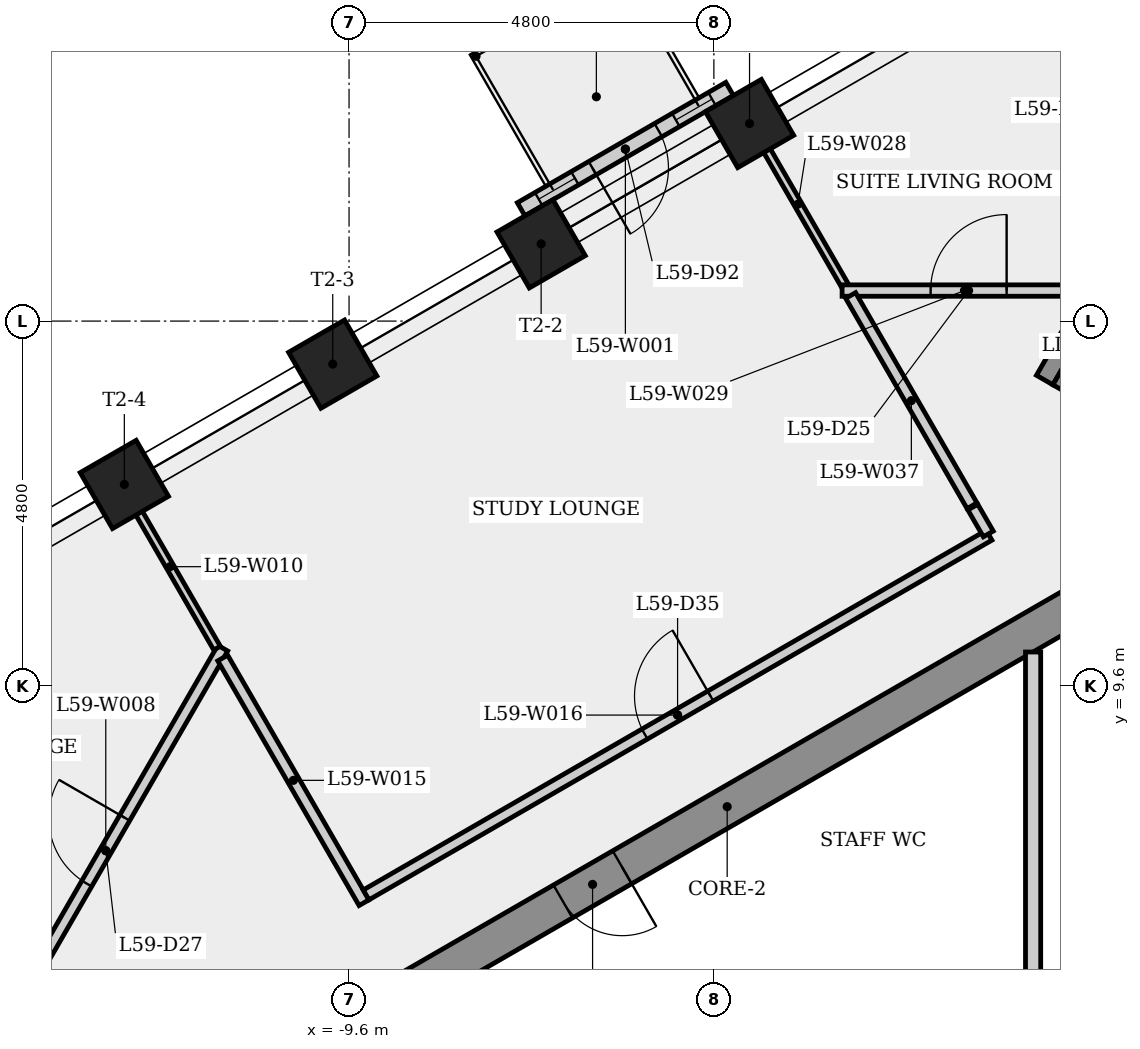
"""IFC4 building model, lengths in metres.
Left out: names, types, materials, properties, quantities, classifications, styles, units other than length and angle.
Written with IfcOpenShell. Run it as: python <this file> out.ifc"""

import sys

from ifc_helpers import new_model, si_unit, direction, frame, frame_2d, origin, origin_2d, place, context, subcontext, project, spatial, rectangle, extrude, element, fill, save


model = new_model("IFC4")
c1 = context("Model", 3, precision=1e-05, world=origin(), true_north=direction((0.0, 1.0)))
c2 = subcontext(c1, "Body", "Model", "MODEL_VIEW")
j1 = project(units=[si_unit("LENGTHUNIT", "METRE"), si_unit("PLANEANGLEUNIT", "RADIAN")], contexts=[c1])
p1 = place(None, origin())
s1 = spatial("IfcSite", under=j1, at=p1, CompositionType="ELEMENT")
p2 = place(p1, origin())
s2 = spatial("IfcBuilding", under=s1, at=p2, CompositionType="ELEMENT")
p3 = place(p2, frame((0.0, 0.0, 222.3)))
s3 = spatial("IfcBuildingStorey", under=s2, at=p3, CompositionType="ELEMENT", Elevation=222.3)
p4 = place(p3, frame((9.375, 5.268, 0.0), z_axis=(0.0, 0.0, 1.0), x_axis=(-0.866023993627, 0.500002442456, 0.0)))
e1 = element("IfcWall", 1, at=p4, inside=s3, PredefinedType="SHEAR", context=c2, shape_type="SweptSolid", body=[
    extrude(rectangle(XDim=10.97, YDim=0.5, at=frame_2d((5.485, 0.0))), origin(), (0.0, 0.0, 1.0), 3.4),
])
p5 = place(p4, frame((5.382, 0.0, 0.0)))
e2 = element("IfcOpeningElement", 2, at=p5, cuts=e1, PredefinedType="OPENING", context=c2, shape_type="SweptSolid", body=[
    extrude(rectangle(XDim=0.9, YDim=2.1, at=frame_2d((0.45, 1.05))), frame((0.0, 0.26, 0.0), z_axis=(0.0, -1.0, 0.0), x_axis=(1.0, 0.0, 0.0)), (0.0, 0.0, 1.0), 0.52),
])
p6 = place(p3, frame((0.125, 10.753, 0.0), z_axis=(0.0, 0.0, 1.0), x_axis=(-0.866023993627, -0.500002442456, 0.0)))
e3 = element("IfcWall", 3, at=p6, inside=s3, PredefinedType="SHEAR", context=c2, shape_type="SweptSolid", body=[
    extrude(rectangle(XDim=10.97, YDim=0.5, at=frame_2d((5.485, 0.0))), origin(), (0.0, 0.0, 1.0), 3.4),
])
p7 = place(p6, frame((7.08, 0.0, 0.0)))
e4 = element("IfcOpeningElement", 4, at=p7, cuts=e3, PredefinedType="OPENING", context=c2, shape_type="SweptSolid", body=[
    extrude(rectangle(XDim=0.9, YDim=2.1, at=frame_2d((0.45, 1.05))), frame((0.0, 0.26, 0.0), z_axis=(0.0, -1.0, 0.0), x_axis=(1.0, 0.0, 0.0)), (0.0, 0.0, 1.0), 0.52),
])
for number, where, z_axis, x_axis in (
    (5, (-4.331, 17.0, 0.0), (0.0, 0.0, 1.0), (-0.5, 0.866, 0.0)),
    (6, (-7.073, 15.417, 0.0), (0.0, 0.0, 1.0), (-0.5, 0.866, 0.0)),
    (7, (-9.815, 13.833, 0.0), (0.0, 0.0, 1.0), (-0.5, 0.866, 0.0)),
    (8, (-12.557, 12.25, 0.0), (0.0, 0.0, 1.0), (-0.5, 0.866, 0.0)),
):
    element("IfcColumn", number, at=place(p3, frame(where, z_axis=z_axis, x_axis=x_axis)), inside=s3, PredefinedType="COLUMN", context=c2, shape_type="SweptSolid", body=[
        extrude(rectangle(XDim=0.85, YDim=0.85, at=origin_2d()), origin(), (0.0, 0.0, 1.0), 3.4),
    ])
p8 = place(p3, frame((-4.593, 17.454, 0.0), z_axis=(0.0, 0.0, 1.0), x_axis=(-0.866023832351, -0.500002721793, 0.0)))
e9 = element("IfcWall", 9, at=p8, inside=s3, PredefinedType="SOLIDWALL", context=c2, shape_type="SweptSolid", body=[
    extrude(rectangle(XDim=3.167, YDim=0.2, at=frame_2d((1.583, 0.0))), origin(), (0.0, 0.0, 1.0), 3.4),
])
p9 = place(p8, frame((1.083, 0.0, 0.0)))
e10 = element("IfcOpeningElement", 10, at=p9, cuts=e9, PredefinedType="OPENING", context=c2, shape_type="SweptSolid", body=[
    extrude(rectangle(XDim=1.0, YDim=2.4, at=frame_2d((0.5, 1.2))), frame((0.0, 0.11, 0.0), z_axis=(0.0, -1.0, 0.0), x_axis=(1.0, 0.0, 0.0)), (0.0, 0.0, 1.0), 0.22),
])
p10 = place(p8, frame((0.267, 0.0, 0.9)))
e11 = element("IfcOpeningElement", 11, at=p10, cuts=e9, PredefinedType="OPENING", context=c2, shape_type="SweptSolid", body=[
    extrude(rectangle(XDim=0.55, YDim=1.5, at=frame_2d((0.275, 0.75))), frame((0.0, 0.11, 0.0), z_axis=(0.0, -1.0, 0.0), x_axis=(1.0, 0.0, 0.0)), (0.0, 0.0, 1.0), 0.22),
])
p11 = place(p8, frame((2.35, 0.0, 0.9)))
e12 = element("IfcOpeningElement", 12, at=p11, cuts=e9, PredefinedType="OPENING", context=c2, shape_type="SweptSolid", body=[
    extrude(rectangle(XDim=0.55, YDim=1.5, at=frame_2d((0.275, 0.75))), frame((0.0, 0.11, 0.0), z_axis=(0.0, -1.0, 0.0), x_axis=(1.0, 0.0, 0.0)), (0.0, 0.0, 1.0), 0.22),
])
p12 = place(p3, frame((-14.34, 4.766, 0.0), z_axis=(0.0, 0.0, 1.0), x_axis=(0.500003992843, 0.866023098503, 0.0)))
e13 = element("IfcWall", 13, at=p12, inside=s3, PredefinedType="PARTITIONING", context=c2, shape_type="SweptSolid", body=[
    extrude(rectangle(XDim=6.155, YDim=0.15, at=frame_2d((3.078, 0.0))), origin(), (0.0, 0.0, 1.0), 3.05),
])
p13 = place(p12, frame((2.578, 0.0, 0.0)))
e14 = element("IfcOpeningElement", 14, at=p13, cuts=e13, PredefinedType="OPENING", context=c2, shape_type="SweptSolid", body=[
    extrude(rectangle(XDim=1.0, YDim=2.1, at=frame_2d((0.5, 1.05))), frame((0.0, 0.085, 0.0), z_axis=(0.0, -1.0, 0.0), x_axis=(1.0, 0.0, 0.0)), (0.0, 0.0, 1.0), 0.17),
])
p14 = place(p3, frame((-12.574, 12.24, 0.0), z_axis=(0.0, 0.0, 1.0), x_axis=(0.500032699561, -0.866006523861, 0.0)))
e15 = element("IfcWall", 15, at=p14, inside=s3, PredefinedType="PARTITIONING", context=c2, shape_type="SweptSolid", body=[
    extrude(rectangle(XDim=2.475, YDim=0.1, at=frame_2d((1.237, 0.0))), origin(), (0.0, 0.0, 1.0), 3.05),
])
p15 = place(p3, frame((-11.262, 9.967, 0.0), z_axis=(0.0, 0.0, 1.0), x_axis=(0.499995303914, -0.866028115054, 0.0)))
e16 = element("IfcWall", 16, at=p15, inside=s3, PredefinedType="PARTITIONING", context=c2, shape_type="SweptSolid", body=[
    extrude(rectangle(XDim=3.718, YDim=0.15, at=frame_2d((1.859, 0.0))), origin(), (0.0, 0.0, 1.0), 3.05),
])
p16 = place(p3, frame((-9.376, 6.85, 0.0), z_axis=(0.0, 0.0, 1.0), x_axis=(0.866029654818, 0.499992636921, 0.0)))
e17 = element("IfcWall", 17, at=p16, inside=s3, PredefinedType="PARTITIONING", context=c2, shape_type="SweptSolid", body=[
    extrude(rectangle(XDim=9.465, YDim=0.15, at=frame_2d((4.732, 0.0))), origin(), (0.0, 0.0, 1.0), 3.05),
])
p17 = place(p16, frame((4.232, 0.0, 0.0)))
e18 = element("IfcOpeningElement", 18, at=p17, cuts=e17, PredefinedType="OPENING", context=c2, shape_type="SweptSolid", body=[
    extrude(rectangle(XDim=1.0, YDim=2.1, at=frame_2d((0.5, 1.05))), frame((0.0, 0.085, 0.0), z_axis=(0.0, -1.0, 0.0), x_axis=(1.0, 0.0, 0.0)), (0.0, 0.0, 1.0), 0.17),
])
p18 = place(p3, frame((-3.076, 14.867, 0.0), z_axis=(0.0, 0.0, 1.0), x_axis=(-0.500001430823, 0.866024577697, 0.0)))
e19 = element("IfcWall", 19, at=p18, inside=s3, PredefinedType="PARTITIONING", context=c2, shape_type="SweptSolid", body=[
    extrude(rectangle(XDim=2.475, YDim=0.1, at=frame_2d((1.237, 0.0))), origin(), (0.0, 0.0, 1.0), 3.05),
])
p19 = place(p3, frame((-3.113, 14.802, 0.0), z_axis=(0.0, 0.0, 1.0), x_axis=(1.0, 0.0, 0.0)))
e20 = element("IfcWall", 20, at=p19, inside=s3, PredefinedType="PARTITIONING", context=c2, shape_type="SweptSolid", body=[
    extrude(rectangle(XDim=3.22, YDim=0.15, at=frame_2d((1.61, 0.0))), origin(), (0.0, 0.0, 1.0), 3.05),
])
p20 = place(p19, frame((1.165, 0.0, 0.0)))
e21 = element("IfcOpeningElement", 21, at=p20, cuts=e20, PredefinedType="OPENING", context=c2, shape_type="SweptSolid", body=[
    extrude(rectangle(XDim=1.0, YDim=2.1, at=frame_2d((0.5, 1.05))), frame((0.0, 0.085, 0.0), z_axis=(0.0, -1.0, 0.0), x_axis=(1.0, 0.0, 0.0)), (0.0, 0.0, 1.0), 0.17),
])
p21 = place(p3, frame((-1.403, 11.97, 0.0), z_axis=(0.0, 0.0, 1.0), x_axis=(-0.499960573946, 0.866048165231, 0.0)))
e22 = element("IfcWall", 22, at=p21, inside=s3, PredefinedType="PARTITIONING", context=c2, shape_type="SweptSolid", body=[
    extrude(rectangle(XDim=3.195, YDim=0.15, at=frame_2d((1.598, 0.0))), origin(), (0.0, 0.0, 1.0), 3.05),
])
p22 = place(p3, frame((-1.393, 11.952, 0.0), z_axis=(0.0, 0.0, 1.0), x_axis=(0.500068051468, -0.865986110686, 0.0)))
e23 = element("IfcWall", 23, at=p22, inside=s3, PredefinedType="PARTITIONING", context=c2, shape_type="SweptSolid", body=[
    extrude(rectangle(XDim=0.408, YDim=0.15, at=frame_2d((0.204, 0.0))), origin(), (0.0, 0.0, 1.0), 3.05),
])
p23 = place(p3, frame((-0.6, 10.046, 0.0), z_axis=(0.0, 0.0, 1.0), x_axis=(0.0, -1.0, 0.0)))
e24 = element("IfcWall", 24, at=p23, inside=s3, PredefinedType="PARTITIONING", context=c2, shape_type="SweptSolid", body=[
    extrude(rectangle(XDim=4.771, YDim=0.2, at=frame_2d((2.385, 0.0))), origin(), (0.0, 0.0, 1.0), 3.05),
])
p24 = place(p3, frame((-0.448, 13.624, 0.0), z_axis=(0.0, 0.0, 1.0), x_axis=(0.500037662692, 0.866003658127, 0.0)))
e25 = element("IfcWall", 25, at=p24, inside=s3, PredefinedType="SHEAR", context=c2, shape_type="SweptSolid", body=[
    extrude(rectangle(XDim=2.95, YDim=0.25, at=frame_2d((1.475, 0.0))), origin(), (0.0, 0.0, 1.0), 3.05),
])
p25 = place(p3, frame((2.581, 12.02, 0.0), z_axis=(0.0, 0.0, 1.0), x_axis=(-0.866040211805, 0.499974350878, 0.0)))
e26 = element("IfcWall", 26, at=p25, inside=s3, PredefinedType="SHEAR", context=c2, shape_type="SweptSolid", body=[
    extrude(rectangle(XDim=3.3, YDim=0.25, at=frame_2d((1.65, 0.0))), origin(), (0.0, 0.0, 1.0), 3.05),
])
p26 = place(p9, origin())
e27 = element("IfcDoor", 27, at=p26, inside=s3, OperationType="SINGLE_SWING_RIGHT", PredefinedType="DOOR", context=c2, shape_type="SweptSolid", body=[
    extrude(rectangle(XDim=1.0, YDim=2.4, at=frame_2d((0.5, 1.2))), frame((0.0, 0.025, 0.0), z_axis=(0.0, -1.0, 0.0), x_axis=(1.0, 0.0, 0.0)), (0.0, 0.0, 1.0), 0.05),
])
fill(e10, e27)
p27 = place(p10, origin())
e28 = element("IfcWindow", 28, at=p27, inside=s3, PartitioningType="SINGLE_PANEL", PredefinedType="WINDOW", context=c2, shape_type="SweptSolid", body=[
    extrude(rectangle(XDim=0.55, YDim=1.5, at=frame_2d((0.275, 0.75))), frame((0.0, 0.03, 0.0), z_axis=(0.0, -1.0, 0.0), x_axis=(1.0, 0.0, 0.0)), (0.0, 0.0, 1.0), 0.06),
])
fill(e11, e28)
p28 = place(p11, origin())
e29 = element("IfcWindow", 29, at=p28, inside=s3, PartitioningType="SINGLE_PANEL", PredefinedType="WINDOW", context=c2, shape_type="SweptSolid", body=[
    extrude(rectangle(XDim=0.55, YDim=1.5, at=frame_2d((0.275, 0.75))), frame((0.0, 0.03, 0.0), z_axis=(0.0, -1.0, 0.0), x_axis=(1.0, 0.0, 0.0)), (0.0, 0.0, 1.0), 0.06),
])
fill(e12, e29)
p29 = place(p20, origin())
e30 = element("IfcDoor", 30, at=p29, inside=s3, OperationType="SINGLE_SWING_RIGHT", PredefinedType="DOOR", context=c2, shape_type="SweptSolid", body=[
    extrude(rectangle(XDim=1.0, YDim=2.1, at=frame_2d((0.5, 1.05))), frame((0.0, 0.025, 0.0), z_axis=(0.0, -1.0, 0.0), x_axis=(1.0, 0.0, 0.0)), (0.0, 0.0, 1.0), 0.05),
])
fill(e21, e30)
p30 = place(p13, origin())
e31 = element("IfcDoor", 31, at=p30, inside=s3, OperationType="SINGLE_SWING_RIGHT", PredefinedType="DOOR", context=c2, shape_type="SweptSolid", body=[
    extrude(rectangle(XDim=1.0, YDim=2.1, at=frame_2d((0.5, 1.05))), frame((0.0, 0.025, 0.0), z_axis=(0.0, -1.0, 0.0), x_axis=(1.0, 0.0, 0.0)), (0.0, 0.0, 1.0), 0.05),
])
fill(e14, e31)
p31 = place(p17, origin())
e32 = element("IfcDoor", 32, at=p31, inside=s3, OperationType="SINGLE_SWING_RIGHT", PredefinedType="DOOR", context=c2, shape_type="SweptSolid", body=[
    extrude(rectangle(XDim=1.0, YDim=2.1, at=frame_2d((0.5, 1.05))), frame((0.0, 0.025, 0.0), z_axis=(0.0, -1.0, 0.0), x_axis=(1.0, 0.0, 0.0)), (0.0, 0.0, 1.0), 0.05),
])
fill(e18, e32)
p32 = place(p7, origin())
e33 = element("IfcDoor", 33, at=p32, inside=s3, OperationType="SINGLE_SWING_LEFT", PredefinedType="DOOR", context=c2, shape_type="SweptSolid", body=[
    extrude(rectangle(XDim=0.9, YDim=2.1, at=frame_2d((0.45, 1.05))), frame((0.0, 0.025, 0.0), z_axis=(0.0, -1.0, 0.0), x_axis=(1.0, 0.0, 0.0)), (0.0, 0.0, 1.0), 0.05),
])
fill(e4, e33)
save(model, sys.argv[1])
